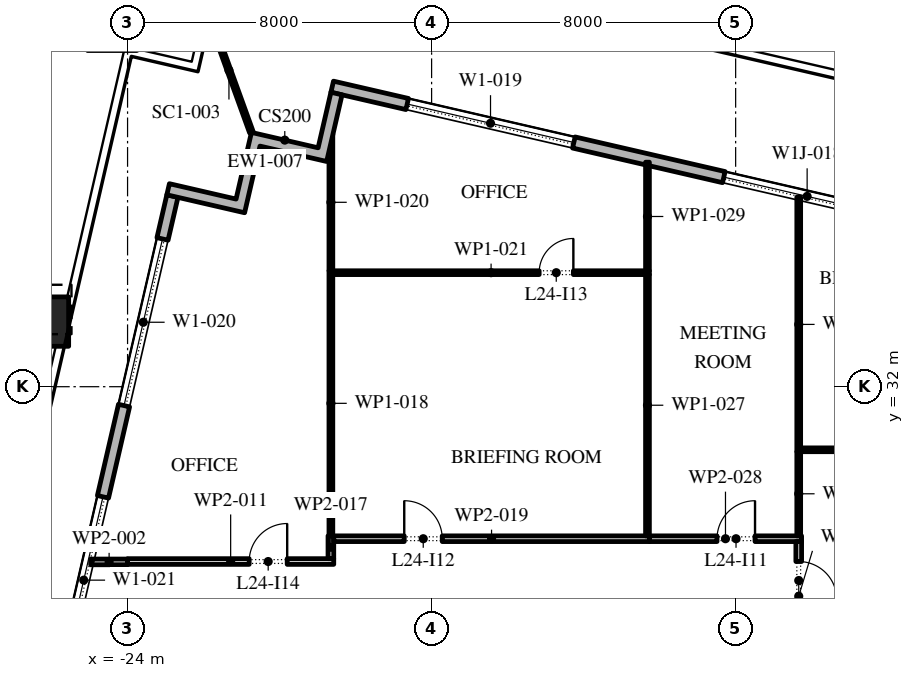
"""IFC4 building model, lengths in metres.
Left out: names, types, materials, properties, quantities, classifications, styles, units other than length and angle.
Written with IfcOpenShell. Run it as: python <this file> out.ifc"""

import sys

from ifc_helpers import new_model, si_unit, direction, frame, frame_2d, origin, origin_2d, place, context, subcontext, project, spatial, polyline, rectangle, outline, extrude, element, fill, save


model = new_model("IFC4")
c1 = context("Model", 3, precision=1e-05, world=origin(), true_north=direction((0.0, 1.0)))
c2 = subcontext(c1, "Body", "Model", "MODEL_VIEW")
j1 = project(units=[si_unit("LENGTHUNIT", "METRE"), si_unit("PLANEANGLEUNIT", "RADIAN")], contexts=[c1])
p1 = place(None, origin())
s1 = spatial("IfcSite", under=j1, at=p1, CompositionType="ELEMENT")
p2 = place(p1, origin())
s2 = spatial("IfcBuilding", under=s1, at=p2, CompositionType="ELEMENT")
p3 = place(p2, frame((0.0, 0.0, 114.0)))
s3 = spatial("IfcBuildingStorey", under=s2, at=p3, CompositionType="ELEMENT", Elevation=114.0)
p4 = place(p3, frame((-24.403, 41.496, 0.0), z_axis=(0.020377493232, 0.0882252832, 0.995892091129), x_axis=(-0.97434807649, 0.225046274885, 0.0)))
e1 = element("IfcColumn", 1, at=p4, inside=s3, PredefinedType="COLUMN", context=c2, shape_type="SweptSolid", body=[
    extrude(rectangle(XDim=1.3, YDim=1.3, at=origin_2d()), origin(), (0.0, 0.0, 1.0), 4.217),
])
p5 = place(p3, frame((-26.2, 33.713, 0.0), z_axis=(0.017502025619, 0.075687567741, 0.996977969259), x_axis=(-0.974290512438, 0.225295355862, 0.0)))
e2 = element("IfcColumn", 2, at=p5, inside=s3, PredefinedType="COLUMN", context=c2, shape_type="SweptSolid", body=[
    extrude(rectangle(XDim=1.3, YDim=1.3, at=origin_2d()), origin(), (0.0, 0.0, 1.0), 4.213),
])
p6 = place(p3, frame((31.078, 28.421, 0.0), z_axis=(0.0, 0.0, 1.0), x_axis=(-0.974370456532, 0.224949357493, 0.0)))
e3 = element("IfcWall", 3, at=p6, inside=s3, PredefinedType="STANDARD", context=c2, shape_type="SweptSolid", body=[
    extrude(rectangle(XDim=51.0, YDim=0.3, at=frame_2d((25.5, 0.0))), origin(), (0.0, 0.0, 1.0), 4.0),
])
p7 = place(p6, frame((1.875, 0.0, 0.45)))
e4 = element("IfcOpeningElement", 4, at=p7, cuts=e3, PredefinedType="OPENING", context=c2, shape_type="SweptSolid", body=[
    extrude(rectangle(XDim=4.5, YDim=3.0, at=frame_2d((2.25, 1.5))), frame((0.0, 0.16, 0.0), z_axis=(0.0, -1.0, 0.0), x_axis=(1.0, 0.0, 0.0)), (0.0, 0.0, 1.0), 0.32),
])
p8 = place(p6, frame((10.275, 0.0, 0.45)))
e5 = element("IfcOpeningElement", 5, at=p8, cuts=e3, PredefinedType="OPENING", context=c2, shape_type="SweptSolid", body=[
    extrude(rectangle(XDim=4.5, YDim=2.875, at=frame_2d((2.25, 1.438))), frame((0.0, 0.16, 0.0), z_axis=(0.0, -1.0, 0.0), x_axis=(1.0, 0.0, 0.0)), (0.0, 0.0, 1.0), 0.32),
])
p9 = place(p6, frame((18.825, 0.0, 0.45)))
e6 = element("IfcOpeningElement", 6, at=p9, cuts=e3, PredefinedType="OPENING", context=c2, shape_type="SweptSolid", body=[
    extrude(rectangle(XDim=4.5, YDim=2.825, at=frame_2d((2.25, 1.413))), frame((0.0, 0.16, 0.0), z_axis=(0.0, -1.0, 0.0), x_axis=(1.0, 0.0, 0.0)), (0.0, 0.0, 1.0), 0.32),
])
p10 = place(p6, frame((27.075, 0.0, 0.0)))
e7 = element("IfcOpeningElement", 7, at=p10, cuts=e3, PredefinedType="OPENING", context=c2, shape_type="SweptSolid", body=[
    extrude(rectangle(XDim=2.4, YDim=3.2, at=frame_2d((1.2, 1.6))), frame((0.0, 0.16, 0.0), z_axis=(0.0, -1.0, 0.0), x_axis=(1.0, 0.0, 0.0)), (0.0, 0.0, 1.0), 0.32),
])
p11 = place(p6, frame((35.925, 0.0, 0.45)))
e8 = element("IfcOpeningElement", 8, at=p11, cuts=e3, PredefinedType="OPENING", context=c2, shape_type="SweptSolid", body=[
    extrude(rectangle(XDim=4.5, YDim=2.675, at=frame_2d((2.25, 1.337))), frame((0.0, 0.16, 0.0), z_axis=(0.0, -1.0, 0.0), x_axis=(1.0, 0.0, 0.0)), (0.0, 0.0, 1.0), 0.32),
])
p12 = place(p6, frame((44.475, 0.0, 0.45)))
e9 = element("IfcOpeningElement", 9, at=p12, cuts=e3, PredefinedType="OPENING", context=c2, shape_type="SweptSolid", body=[
    extrude(rectangle(XDim=4.5, YDim=3.05, at=frame_2d((2.25, 1.525))), frame((0.0, 0.16, 0.0), z_axis=(0.0, -1.0, 0.0), x_axis=(1.0, 0.0, 0.0)), (0.0, 0.0, 1.0), 0.32),
])
p13 = place(p3, frame((-22.82, 37.016, 0.0), z_axis=(0.0, 0.0, 1.0), x_axis=(-0.224953880882, -0.974369412223, 0.0)))
e10 = element("IfcWall", 10, at=p13, inside=s3, PredefinedType="STANDARD", context=c2, shape_type="SweptSolid", body=[
    extrude(rectangle(XDim=49.5, YDim=0.3, at=frame_2d((24.75, 0.0))), origin(), (0.0, 0.0, 1.0), 4.0),
])
p14 = place(p13, frame((1.157, 0.0, 0.45)))
e11 = element("IfcOpeningElement", 11, at=p14, cuts=e10, PredefinedType="OPENING", context=c2, shape_type="SweptSolid", body=[
    extrude(rectangle(XDim=4.5, YDim=3.05, at=frame_2d((2.25, 1.525))), frame((0.0, 0.16, 0.0), z_axis=(0.0, -1.0, 0.0), x_axis=(1.0, 0.0, 0.0)), (0.0, 0.0, 1.0), 0.32),
])
p15 = place(p13, frame((8.121, 0.0, 0.45)))
e12 = element("IfcOpeningElement", 12, at=p15, cuts=e10, PredefinedType="OPENING", context=c2, shape_type="SweptSolid", body=[
    extrude(rectangle(XDim=4.5, YDim=3.05, at=frame_2d((2.25, 1.525))), frame((0.0, 0.16, 0.0), z_axis=(0.0, -1.0, 0.0), x_axis=(1.0, 0.0, 0.0)), (0.0, 0.0, 1.0), 0.32),
])
p16 = place(p13, frame((15.236, 0.0, 0.45)))
e13 = element("IfcOpeningElement", 13, at=p16, cuts=e10, PredefinedType="OPENING", context=c2, shape_type="SweptSolid", body=[
    extrude(rectangle(XDim=4.5, YDim=3.05, at=frame_2d((2.25, 1.525))), frame((0.0, 0.16, 0.0), z_axis=(0.0, -1.0, 0.0), x_axis=(1.0, 0.0, 0.0)), (0.0, 0.0, 1.0), 0.32),
])
p17 = place(p13, frame((23.4, 0.0, 0.0)))
e14 = element("IfcOpeningElement", 14, at=p17, cuts=e10, PredefinedType="OPENING", context=c2, shape_type="SweptSolid", body=[
    extrude(rectangle(XDim=2.4, YDim=3.5, at=frame_2d((1.2, 1.75))), frame((0.0, 0.16, 0.0), z_axis=(0.0, -1.0, 0.0), x_axis=(1.0, 0.0, 0.0)), (0.0, 0.0, 1.0), 0.32),
])
p18 = place(p13, frame((29.464, 0.0, 0.45)))
e15 = element("IfcOpeningElement", 15, at=p18, cuts=e10, PredefinedType="OPENING", context=c2, shape_type="SweptSolid", body=[
    extrude(rectangle(XDim=4.5, YDim=2.875, at=frame_2d((2.25, 1.438))), frame((0.0, 0.16, 0.0), z_axis=(0.0, -1.0, 0.0), x_axis=(1.0, 0.0, 0.0)), (0.0, 0.0, 1.0), 0.32),
])
p19 = place(p13, frame((36.579, 0.0, 0.45)))
e16 = element("IfcOpeningElement", 16, at=p19, cuts=e10, PredefinedType="OPENING", context=c2, shape_type="SweptSolid", body=[
    extrude(rectangle(XDim=4.5, YDim=2.675, at=frame_2d((2.25, 1.337))), frame((0.0, 0.16, 0.0), z_axis=(0.0, -1.0, 0.0), x_axis=(1.0, 0.0, 0.0)), (0.0, 0.0, 1.0), 0.32),
])
p20 = place(p13, frame((43.693, 0.0, 0.45)))
e17 = element("IfcOpeningElement", 17, at=p20, cuts=e10, PredefinedType="OPENING", context=c2, shape_type="SweptSolid", body=[
    extrude(rectangle(XDim=4.5, YDim=3.05, at=frame_2d((2.25, 1.525))), frame((0.0, 0.16, 0.0), z_axis=(0.0, -1.0, 0.0), x_axis=(1.0, 0.0, 0.0)), (0.0, 0.0, 1.0), 0.32),
])
p21 = place(p3, origin())
e18 = element("IfcWall", 18, at=p21, inside=s3, PredefinedType="STANDARD", context=c2, shape_type="SweptSolid", body=[
    extrude(outline(polyline([(-22.967, 37.049), (-22.899, 37.342), (-21.145, 36.937), (-20.74, 38.691), (-18.986, 38.286), (-18.649, 39.747), (-18.357, 39.68), (-18.762, 37.926), (-20.515, 38.331), (-20.92, 36.577), (-22.967, 37.049)])), origin(), (0.0, 0.0, 1.0), 4.0),
])
p22 = place(p3, frame((-20.74, 38.691, -0.05), z_axis=(0.0, 0.0, 1.0), x_axis=(-0.340463549829, 0.94025771533, 0.0)))
e19 = element("IfcWall", 19, at=p22, inside=s3, PredefinedType="STANDARD", context=c2, shape_type="SweptSolid", body=[
    extrude(rectangle(XDim=3.479, YDim=0.1, at=frame_2d((1.739, 0.0))), origin(), (0.0, 0.0, 1.0), 4.05),
])
p23 = place(p3, frame((-24.971, 27.39, 0.0), z_axis=(0.0, 0.0, 1.0), x_axis=(1.0, 0.0, 0.0)))
e20 = element("IfcWall", 20, at=p23, inside=s3, PredefinedType="PARTITIONING", context=c2, shape_type="SweptSolid", body=[
    extrude(rectangle(XDim=0.971, YDim=0.15, at=frame_2d((0.485, 0.0))), origin(), (0.0, 0.0, 1.0), 4.0),
])
p24 = place(p3, frame((-24.0, 27.4, 0.0), z_axis=(0.0, 0.0, 1.0), x_axis=(1.0, 0.0, 0.0)))
e21 = element("IfcWall", 21, at=p24, inside=s3, PredefinedType="PARTITIONING", context=c2, shape_type="SweptSolid", body=[
    extrude(rectangle(XDim=5.425, YDim=0.15, at=frame_2d((2.712, 0.0))), origin(), (0.0, 0.0, 1.0), 4.0),
])
p25 = place(p24, frame((3.2, 0.0, 0.0)))
e22 = element("IfcOpeningElement", 22, at=p25, cuts=e21, PredefinedType="OPENING", context=c2, shape_type="SweptSolid", body=[
    extrude(rectangle(XDim=1.0, YDim=2.1, at=frame_2d((0.5, 1.05))), frame((0.0, 0.085, 0.0), z_axis=(0.0, -1.0, 0.0), x_axis=(1.0, 0.0, 0.0)), (0.0, 0.0, 1.0), 0.17),
])
p26 = place(p3, frame((-18.65, 27.475, 0.0), z_axis=(0.0, 0.0, 1.0), x_axis=(0.0, 1.0, 0.0)))
e23 = element("IfcWall", 23, at=p26, inside=s3, PredefinedType="PARTITIONING", context=c2, shape_type="SweptSolid", body=[
    extrude(rectangle(XDim=0.6, YDim=0.15, at=frame_2d((0.3, 0.0))), origin(), (0.0, 0.0, 1.0), 4.0),
])
p27 = place(p3, frame((-18.65, 28.075, 0.0), z_axis=(0.0, 0.0, 1.0), x_axis=(0.0, 1.0, 0.0)))
e24 = element("IfcWall", 24, at=p27, inside=s3, PredefinedType="PARTITIONING", context=c2, shape_type="SweptSolid", body=[
    extrude(rectangle(XDim=6.975, YDim=0.1, at=frame_2d((3.488, 0.0))), origin(), (0.0, 0.0, 1.0), 4.0),
])
p28 = place(p3, frame((-18.575, 28.0, 0.0), z_axis=(0.0, 0.0, 1.0), x_axis=(1.0, 0.0, 0.0)))
e25 = element("IfcWall", 25, at=p28, inside=s3, PredefinedType="PARTITIONING", context=c2, shape_type="SweptSolid", body=[
    extrude(rectangle(XDim=8.305, YDim=0.15, at=frame_2d((4.152, 0.0))), origin(), (0.0, 0.0, 1.0), 4.0),
])
p29 = place(p28, frame((1.855, 0.0, 0.0)))
e26 = element("IfcOpeningElement", 26, at=p29, cuts=e25, PredefinedType="OPENING", context=c2, shape_type="SweptSolid", body=[
    extrude(rectangle(XDim=1.0, YDim=2.1, at=frame_2d((0.5, 1.05))), frame((0.0, 0.085, 0.0), z_axis=(0.0, -1.0, 0.0), x_axis=(1.0, 0.0, 0.0)), (0.0, 0.0, 1.0), 0.17),
])
p30 = place(p3, frame((-18.65, 35.05, 0.0), z_axis=(0.0, 0.0, 1.0), x_axis=(0.0, 1.0, 0.0)))
e27 = element("IfcWall", 27, at=p30, inside=s3, PredefinedType="PARTITIONING", context=c2, shape_type="SweptSolid", body=[
    extrude(rectangle(XDim=3.604, YDim=0.1, at=frame_2d((1.802, 0.0))), origin(), (0.0, 0.0, 1.0), 4.0),
])
p31 = place(p3, frame((-18.6, 35.0, 0.0), z_axis=(0.0, 0.0, 1.0), x_axis=(1.0, 0.0, 0.0)))
e28 = element("IfcWall", 28, at=p31, inside=s3, PredefinedType="PARTITIONING", context=c2, shape_type="SweptSolid", body=[
    extrude(rectangle(XDim=8.33, YDim=0.1, at=frame_2d((4.165, 0.0))), origin(), (0.0, 0.0, 1.0), 4.0),
])
p32 = place(p31, frame((5.43, 0.0, 0.0)))
e29 = element("IfcOpeningElement", 29, at=p32, cuts=e28, PredefinedType="OPENING", context=c2, shape_type="SweptSolid", body=[
    extrude(rectangle(XDim=0.9, YDim=2.1, at=frame_2d((0.45, 1.05))), frame((0.0, 0.06, 0.0), z_axis=(0.0, -1.0, 0.0), x_axis=(1.0, 0.0, 0.0)), (0.0, 0.0, 1.0), 0.12),
])
p33 = place(p3, frame((-10.32, 28.075, 0.0), z_axis=(0.0, 0.0, 1.0), x_axis=(0.0, 1.0, 0.0)))
e30 = element("IfcWall", 30, at=p33, inside=s3, PredefinedType="PARTITIONING", context=c2, shape_type="SweptSolid", body=[
    extrude(rectangle(XDim=6.875, YDim=0.1, at=frame_2d((3.438, 0.0))), origin(), (0.0, 0.0, 1.0), 4.0),
])
p34 = place(p3, frame((-10.27, 28.0, 0.0), z_axis=(0.0, 0.0, 1.0), x_axis=(1.0, 0.0, 0.0)))
e31 = element("IfcWall", 31, at=p34, inside=s3, PredefinedType="PARTITIONING", context=c2, shape_type="SweptSolid", body=[
    extrude(rectangle(XDim=4.005, YDim=0.15, at=frame_2d((2.002, 0.0))), origin(), (0.0, 0.0, 1.0), 4.0),
])
p35 = place(p34, frame((1.78, 0.0, 0.0)))
e32 = element("IfcOpeningElement", 32, at=p35, cuts=e31, PredefinedType="OPENING", context=c2, shape_type="SweptSolid", body=[
    extrude(rectangle(XDim=1.0, YDim=2.1, at=frame_2d((0.5, 1.05))), frame((0.0, 0.085, 0.0), z_axis=(0.0, -1.0, 0.0), x_axis=(1.0, 0.0, 0.0)), (0.0, 0.0, 1.0), 0.17),
])
p36 = place(p3, frame((-10.32, 35.05, 0.0), z_axis=(0.0, 0.0, 1.0), x_axis=(0.0, 1.0, 0.0)))
e33 = element("IfcWall", 33, at=p36, inside=s3, PredefinedType="PARTITIONING", context=c2, shape_type="SweptSolid", body=[
    extrude(rectangle(XDim=2.857, YDim=0.1, at=frame_2d((1.428, 0.0))), origin(), (0.0, 0.0, 1.0), 4.0),
])
p37 = place(p3, frame((-6.34, 27.925, 0.0), z_axis=(0.0, 0.0, 1.0), x_axis=(0.0, -1.0, 0.0)))
e34 = element("IfcWall", 34, at=p37, inside=s3, PredefinedType="PARTITIONING", context=c2, shape_type="SweptSolid", body=[
    extrude(rectangle(XDim=2.875, YDim=0.15, at=frame_2d((1.438, 0.0))), origin(), (0.0, 0.0, 1.0), 4.0),
])
p38 = place(p37, frame((0.525, 0.0, 0.0)))
e35 = element("IfcOpeningElement", 35, at=p38, cuts=e34, PredefinedType="OPENING", context=c2, shape_type="SweptSolid", body=[
    extrude(rectangle(XDim=1.0, YDim=2.1, at=frame_2d((0.5, 1.05))), frame((0.0, 0.085, 0.0), z_axis=(0.0, -1.0, 0.0), x_axis=(1.0, 0.0, 0.0)), (0.0, 0.0, 1.0), 0.17),
])
p39 = place(p3, frame((-6.34, 28.075, 0.0), z_axis=(0.0, 0.0, 1.0), x_axis=(0.0, 1.0, 0.0)))
e36 = element("IfcWall", 36, at=p39, inside=s3, PredefinedType="PARTITIONING", context=c2, shape_type="SweptSolid", body=[
    extrude(rectangle(XDim=2.215, YDim=0.1, at=frame_2d((1.107, 0.0))), origin(), (0.0, 0.0, 1.0), 4.0),
])
p40 = place(p3, frame((-6.34, 30.29, 0.0), z_axis=(0.0, 0.0, 1.0), x_axis=(0.0, 1.0, 0.0)))
e37 = element("IfcWall", 37, at=p40, inside=s3, PredefinedType="PARTITIONING", context=c2, shape_type="SweptSolid", body=[
    extrude(rectangle(XDim=6.698, YDim=0.1, at=frame_2d((3.349, 0.0))), origin(), (0.0, 0.0, 1.0), 4.0),
])
p41 = place(p3, frame((-6.29, 30.34, 0.0), z_axis=(0.0, 0.0, 1.0), x_axis=(1.0, 0.0, 0.0)))
e38 = element("IfcWall", 38, at=p41, inside=s3, PredefinedType="PARTITIONING", context=c2, shape_type="SweptSolid", body=[
    extrude(rectangle(XDim=8.33, YDim=0.1, at=frame_2d((4.165, 0.0))), origin(), (0.0, 0.0, 1.0), 4.0),
])
p42 = place(p41, frame((4.43, 0.0, 0.0)))
e39 = element("IfcOpeningElement", 39, at=p42, cuts=e38, PredefinedType="OPENING", context=c2, shape_type="SweptSolid", body=[
    extrude(rectangle(XDim=0.9, YDim=2.1, at=frame_2d((0.45, 1.05))), frame((0.0, 0.06, 0.0), z_axis=(0.0, -1.0, 0.0), x_axis=(1.0, 0.0, 0.0)), (0.0, 0.0, 1.0), 0.12),
])
p43 = place(p11, origin())
e40 = element("IfcWindow", 40, at=p43, inside=s3, PartitioningType="DOUBLE_PANEL_VERTICAL", PredefinedType="WINDOW", context=c2, shape_type="SweptSolid", body=[
    extrude(rectangle(XDim=4.5, YDim=2.675, at=frame_2d((2.25, 1.337))), frame((0.0, 0.03, 0.0), z_axis=(0.0, -1.0, 0.0), x_axis=(1.0, 0.0, 0.0)), (0.0, 0.0, 1.0), 0.06),
])
fill(e8, e40)
p44 = place(p12, origin())
e41 = element("IfcWindow", 41, at=p44, inside=s3, PartitioningType="DOUBLE_PANEL_VERTICAL", PredefinedType="WINDOW", context=c2, shape_type="SweptSolid", body=[
    extrude(rectangle(XDim=4.5, YDim=3.05, at=frame_2d((2.25, 1.525))), frame((0.0, 0.03, 0.0), z_axis=(0.0, -1.0, 0.0), x_axis=(1.0, 0.0, 0.0)), (0.0, 0.0, 1.0), 0.06),
])
fill(e9, e41)
p45 = place(p14, origin())
e42 = element("IfcWindow", 42, at=p45, inside=s3, PartitioningType="DOUBLE_PANEL_VERTICAL", PredefinedType="WINDOW", context=c2, shape_type="SweptSolid", body=[
    extrude(rectangle(XDim=4.5, YDim=3.05, at=frame_2d((2.25, 1.525))), frame((0.0, 0.03, 0.0), z_axis=(0.0, -1.0, 0.0), x_axis=(1.0, 0.0, 0.0)), (0.0, 0.0, 1.0), 0.06),
])
fill(e11, e42)
p46 = place(p15, origin())
e43 = element("IfcWindow", 43, at=p46, inside=s3, PartitioningType="DOUBLE_PANEL_VERTICAL", PredefinedType="WINDOW", context=c2, shape_type="SweptSolid", body=[
    extrude(rectangle(XDim=4.5, YDim=3.05, at=frame_2d((2.25, 1.525))), frame((0.0, 0.03, 0.0), z_axis=(0.0, -1.0, 0.0), x_axis=(1.0, 0.0, 0.0)), (0.0, 0.0, 1.0), 0.06),
])
fill(e12, e43)
p47 = place(p38, origin())
e44 = element("IfcDoor", 44, at=p47, inside=s3, OperationType="SINGLE_SWING_LEFT", PredefinedType="DOOR", context=c2, shape_type="SweptSolid", body=[
    extrude(rectangle(XDim=1.0, YDim=2.1, at=frame_2d((0.5, 1.05))), frame((0.0, 0.025, 0.0), z_axis=(0.0, -1.0, 0.0), x_axis=(1.0, 0.0, 0.0)), (0.0, 0.0, 1.0), 0.05),
])
fill(e35, e44)
p48 = place(p35, origin())
e45 = element("IfcDoor", 45, at=p48, inside=s3, OperationType="SINGLE_SWING_LEFT", PredefinedType="DOOR", context=c2, shape_type="SweptSolid", body=[
    extrude(rectangle(XDim=1.0, YDim=2.1, at=frame_2d((0.5, 1.05))), frame((0.0, 0.025, 0.0), z_axis=(0.0, -1.0, 0.0), x_axis=(1.0, 0.0, 0.0)), (0.0, 0.0, 1.0), 0.05),
])
fill(e32, e45)
p49 = place(p29, origin())
e46 = element("IfcDoor", 46, at=p49, inside=s3, OperationType="SINGLE_SWING_RIGHT", PredefinedType="DOOR", context=c2, shape_type="SweptSolid", body=[
    extrude(rectangle(XDim=1.0, YDim=2.1, at=frame_2d((0.5, 1.05))), frame((0.0, 0.025, 0.0), z_axis=(0.0, -1.0, 0.0), x_axis=(1.0, 0.0, 0.0)), (0.0, 0.0, 1.0), 0.05),
])
fill(e26, e46)
p50 = place(p32, origin())
e47 = element("IfcDoor", 47, at=p50, inside=s3, OperationType="SINGLE_SWING_LEFT", PredefinedType="DOOR", context=c2, shape_type="SweptSolid", body=[
    extrude(rectangle(XDim=0.9, YDim=2.1, at=frame_2d((0.45, 1.05))), frame((0.0, 0.025, 0.0), z_axis=(0.0, -1.0, 0.0), x_axis=(1.0, 0.0, 0.0)), (0.0, 0.0, 1.0), 0.05),
])
fill(e29, e47)
p51 = place(p25, origin())
e48 = element("IfcDoor", 48, at=p51, inside=s3, OperationType="SINGLE_SWING_LEFT", PredefinedType="DOOR", context=c2, shape_type="SweptSolid", body=[
    extrude(rectangle(XDim=1.0, YDim=2.1, at=frame_2d((0.5, 1.05))), frame((0.0, 0.025, 0.0), z_axis=(0.0, -1.0, 0.0), x_axis=(1.0, 0.0, 0.0)), (0.0, 0.0, 1.0), 0.05),
])
fill(e22, e48)
save(model, sys.argv[1])
